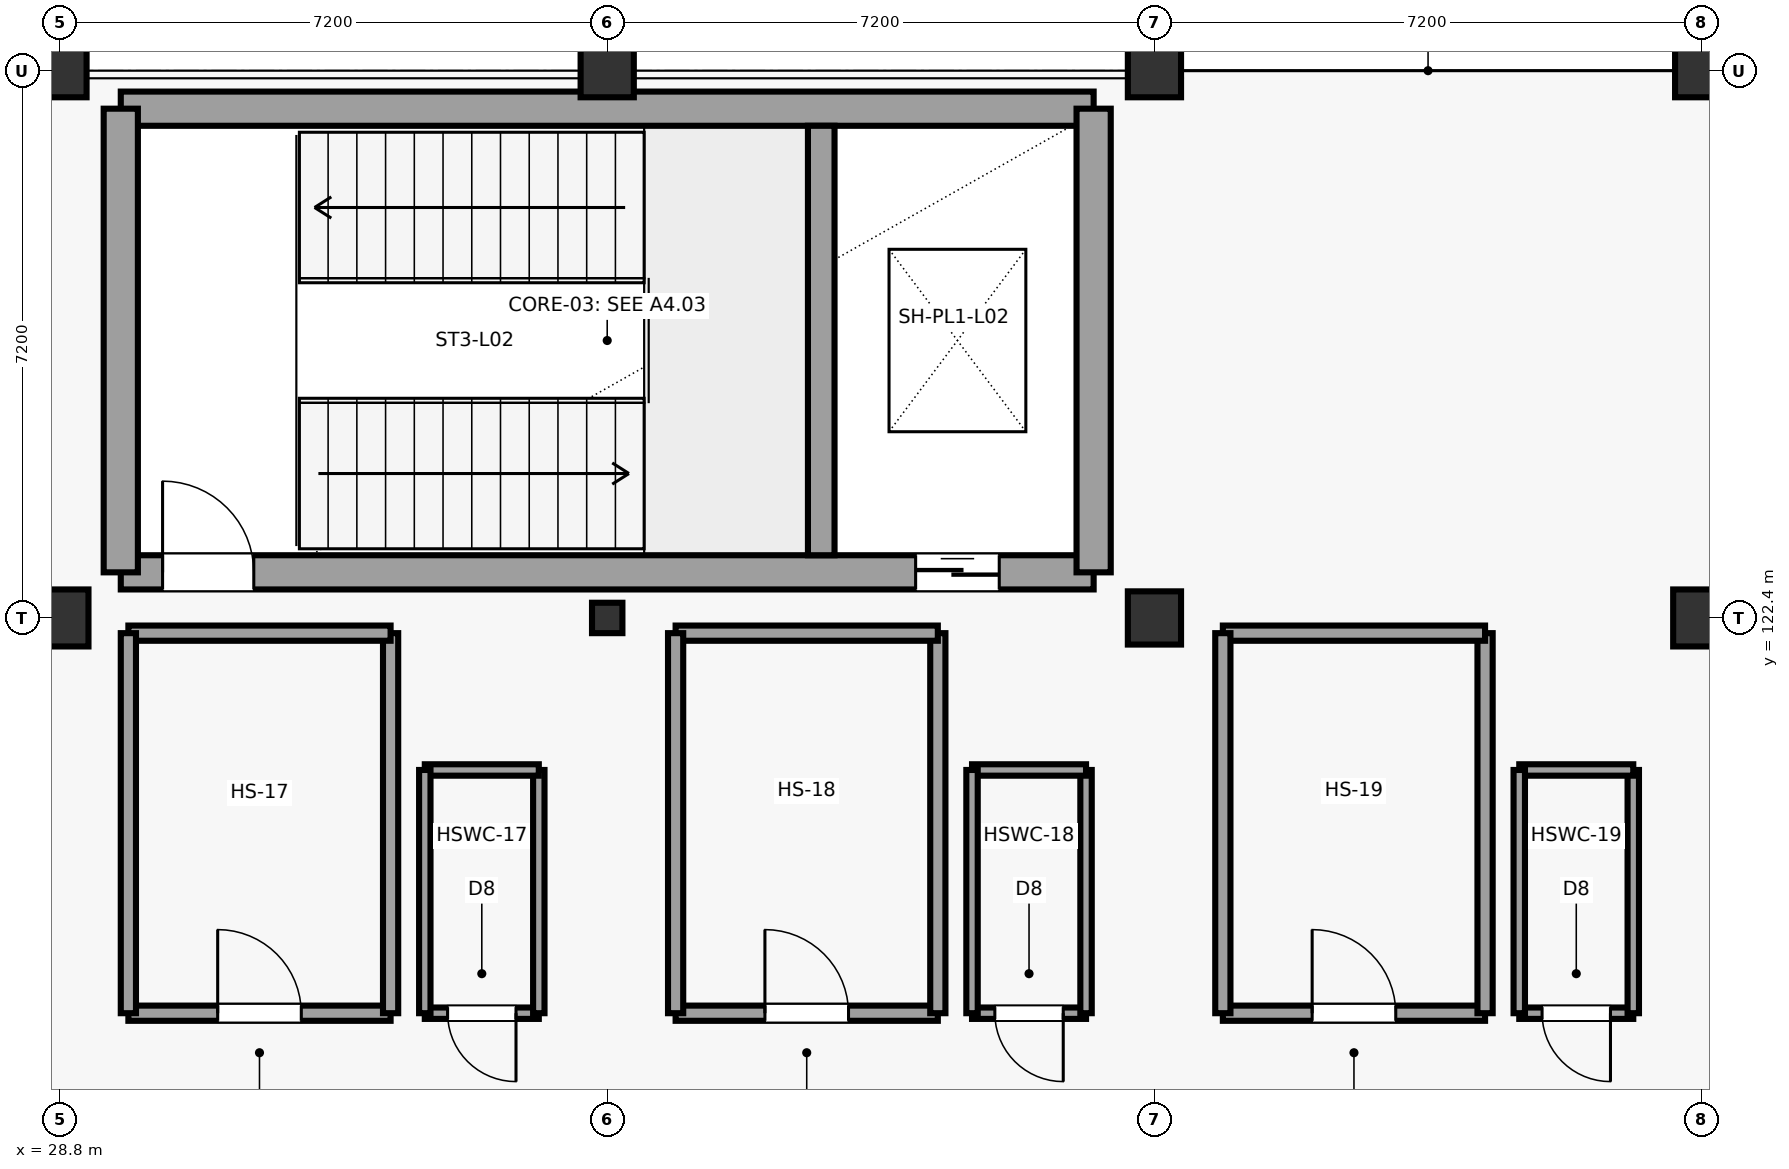
"""IFC4 building model, lengths in metres.
Left out: names, types, materials, properties, quantities, classifications, styles, units other than length and angle.
Written with IfcOpenShell. Run it as: python <this file> out.ifc"""

import sys

from ifc_helpers import new_model, si_unit, direction, frame, frame_2d, origin, origin_2d, place, context, subcontext, project, spatial, rectangle, hollow_rectangle, extrude, element, fill, save


model = new_model("IFC4")
c1 = context("Model", 3, precision=1e-05, world=origin(), true_north=direction((0.0, 1.0)))
c2 = subcontext(c1, "Body", "Model", "MODEL_VIEW")
j1 = project(units=[si_unit("LENGTHUNIT", "METRE"), si_unit("PLANEANGLEUNIT", "RADIAN")], contexts=[c1])
p1 = place(None, origin())
s1 = spatial("IfcSite", under=j1, at=p1, CompositionType="ELEMENT")
p2 = place(p1, origin())
s2 = spatial("IfcBuilding", under=s1, at=p2, CompositionType="ELEMENT")
p3 = place(p2, frame((0.0, 0.0, 9.6)))
s3 = spatial("IfcBuildingStorey", under=s2, at=p3, CompositionType="ELEMENT", Elevation=9.6)
p4 = place(p3, frame((28.8, 122.4, 0.0), z_axis=(0.0, 0.0, 1.0), x_axis=(1.0, 0.0, 0.0)))
e1 = element("IfcColumn", 1, at=p4, inside=s3, PredefinedType="COLUMN", context=c2, shape_type="SweptSolid", body=[
    extrude(rectangle(XDim=0.75, YDim=0.75, at=origin_2d()), origin(), (0.0, 0.0, 1.0), 4.2),
])
p5 = place(p3, frame((28.8, 129.6, 0.0), z_axis=(0.0, 0.0, 1.0), x_axis=(1.0, 0.0, 0.0)))
e2 = element("IfcColumn", 2, at=p5, inside=s3, PredefinedType="COLUMN", context=c2, shape_type="SweptSolid", body=[
    extrude(rectangle(XDim=0.7, YDim=0.7, at=origin_2d()), origin(), (0.0, 0.0, 1.0), 4.2),
])
p6 = place(p3, frame((36.0, 122.4, 0.0), z_axis=(0.0, 0.0, 1.0), x_axis=(1.0, 0.0, 0.0)))
e3 = element("IfcColumn", 3, at=p6, inside=s3, PredefinedType="COLUMN", context=c2, shape_type="SweptSolid", body=[
    extrude(hollow_rectangle(XDim=0.4, YDim=0.4, WallThickness=0.02, at=origin_2d()), origin(), (0.0, 0.0, 1.0), 4.2),
])
for number, where, z_axis, x_axis in (
    (4, (36.0, 129.6, 0.0), (0.0, 0.0, 1.0), (1.0, 0.0, 0.0)),
    (5, (43.2, 122.4, 0.0), (0.0, 0.0, 1.0), (1.0, 0.0, 0.0)),
    (6, (43.2, 129.6, 0.0), (0.0, 0.0, 1.0), (1.0, 0.0, 0.0)),
):
    element("IfcColumn", number, at=place(p3, frame(where, z_axis=z_axis, x_axis=x_axis)), inside=s3, PredefinedType="COLUMN", context=c2, shape_type="SweptSolid", body=[
        extrude(rectangle(XDim=0.7, YDim=0.7, at=origin_2d()), origin(), (0.0, 0.0, 1.0), 4.2),
    ])
p7 = place(p3, frame((50.4, 122.4, 0.0), z_axis=(0.0, 0.0, 1.0), x_axis=(1.0, 0.0, 0.0)))
e7 = element("IfcColumn", 7, at=p7, inside=s3, PredefinedType="COLUMN", context=c2, shape_type="SweptSolid", body=[
    extrude(rectangle(XDim=0.75, YDim=0.75, at=origin_2d()), origin(), (0.0, 0.0, 1.0), 4.2),
])
p8 = place(p3, frame((50.4, 129.6, 0.0), z_axis=(0.0, 0.0, 1.0), x_axis=(1.0, 0.0, 0.0)))
e8 = element("IfcColumn", 8, at=p8, inside=s3, PredefinedType="COLUMN", context=c2, shape_type="SweptSolid", body=[
    extrude(rectangle(XDim=0.7, YDim=0.7, at=origin_2d()), origin(), (0.0, 0.0, 1.0), 4.2),
])
p9 = place(p3, frame((29.6, 123.0, 0.0), z_axis=(0.0, 0.0, 1.0), x_axis=(1.0, 0.0, 0.0)))
e9 = element("IfcWall", 9, at=p9, inside=s3, PredefinedType="SHEAR", context=c2, shape_type="SweptSolid", body=[
    extrude(rectangle(XDim=12.8, YDim=0.45, at=frame_2d((6.4, 0.0))), origin(), (0.0, 0.0, 1.0), 3.88),
])
p10 = place(p9, frame((0.55, 0.0, 0.0)))
e10 = element("IfcOpeningElement", 10, at=p10, cuts=e9, PredefinedType="OPENING", context=c2, shape_type="SweptSolid", body=[
    extrude(rectangle(XDim=1.2, YDim=2.25, at=frame_2d((0.6, 1.125))), frame((0.0, 0.235, 0.0), z_axis=(0.0, -1.0, 0.0), x_axis=(1.0, 0.0, 0.0)), (0.0, 0.0, 1.0), 0.47),
])
p11 = place(p9, frame((10.458, 0.0, 0.0)))
e11 = element("IfcOpeningElement", 11, at=p11, cuts=e9, PredefinedType="OPENING", context=c2, shape_type="SweptSolid", body=[
    extrude(rectangle(XDim=1.1, YDim=2.2, at=frame_2d((0.55, 1.1))), frame((0.0, 0.235, 0.0), z_axis=(0.0, -1.0, 0.0), x_axis=(1.0, 0.0, 0.0)), (0.0, 0.0, 1.0), 0.47),
])
p12 = place(p3, frame((29.6, 129.1, 0.0), z_axis=(0.0, 0.0, 1.0), x_axis=(1.0, 0.0, 0.0)))
e12 = element("IfcWall", 12, at=p12, inside=s3, PredefinedType="SHEAR", context=c2, shape_type="SweptSolid", body=[
    extrude(rectangle(XDim=12.8, YDim=0.45, at=frame_2d((6.4, 0.0))), origin(), (0.0, 0.0, 1.0), 3.88),
])
for number, where, z_axis, x_axis in (
    (13, (29.6, 123.0, 0.0), (0.0, 0.0, 1.0), (0.0, 1.0, 0.0)),
    (14, (42.4, 123.0, 0.0), (0.0, 0.0, 1.0), (0.0, 1.0, 0.0)),
):
    element("IfcWall", number, at=place(p3, frame(where, z_axis=z_axis, x_axis=x_axis)), inside=s3, PredefinedType="SHEAR", context=c2, shape_type="SweptSolid", body=[
        extrude(rectangle(XDim=6.1, YDim=0.45, at=frame_2d((3.05, 0.0))), origin(), (0.0, 0.0, 1.0), 3.88),
    ])
p13 = place(p3, frame((38.816, 123.225, 0.0), z_axis=(0.0, 0.0, 1.0), x_axis=(0.0, 1.0, 0.0)))
e15 = element("IfcWall", 15, at=p13, inside=s3, PredefinedType="SHEAR", context=c2, shape_type="SweptSolid", body=[
    extrude(rectangle(XDim=5.65, YDim=0.35, at=frame_2d((2.825, 0.0))), origin(), (0.0, 0.0, 1.0), 3.88),
])
p14 = place(p3, frame((29.7, 117.2, 0.0), z_axis=(0.0, 0.0, 1.0), x_axis=(1.0, 0.0, 0.0)))
e16 = element("IfcWall", 16, at=p14, inside=s3, PredefinedType="PARTITIONING", context=c2, shape_type="SweptSolid", body=[
    extrude(rectangle(XDim=3.45, YDim=0.2, at=frame_2d((1.725, 0.0))), origin(), (0.0, 0.0, 1.0), 2.94),
])
p15 = place(p14, frame((1.175, 0.0, 0.0)))
e17 = element("IfcOpeningElement", 17, at=p15, cuts=e16, PredefinedType="OPENING", context=c2, shape_type="SweptSolid", body=[
    extrude(rectangle(XDim=1.1, YDim=2.25, at=frame_2d((0.55, 1.125))), frame((0.0, 0.11, 0.0), z_axis=(0.0, -1.0, 0.0), x_axis=(1.0, 0.0, 0.0)), (0.0, 0.0, 1.0), 0.22),
])
p16 = place(p3, frame((33.15, 117.2, 0.0), z_axis=(0.0, 0.0, 1.0), x_axis=(0.0, 1.0, 0.0)))
e18 = element("IfcWall", 18, at=p16, inside=s3, PredefinedType="PARTITIONING", context=c2, shape_type="SweptSolid", body=[
    extrude(rectangle(XDim=5.0, YDim=0.2, at=frame_2d((2.5, 0.0))), origin(), (0.0, 0.0, 1.0), 2.94),
])
p17 = place(p3, frame((33.15, 122.2, 0.0), z_axis=(0.0, 0.0, 1.0), x_axis=(-1.0, 0.0, 0.0)))
e19 = element("IfcWall", 19, at=p17, inside=s3, PredefinedType="PARTITIONING", context=c2, shape_type="SweptSolid", body=[
    extrude(rectangle(XDim=3.45, YDim=0.2, at=frame_2d((1.725, 0.0))), origin(), (0.0, 0.0, 1.0), 2.94),
])
p18 = place(p3, frame((29.7, 122.2, 0.0), z_axis=(0.0, 0.0, 1.0), x_axis=(0.0, -1.0, 0.0)))
e20 = element("IfcWall", 20, at=p18, inside=s3, PredefinedType="PARTITIONING", context=c2, shape_type="SweptSolid", body=[
    extrude(rectangle(XDim=5.0, YDim=0.2, at=frame_2d((2.5, 0.0))), origin(), (0.0, 0.0, 1.0), 2.94),
])
p19 = place(p3, frame((33.6, 117.2, 0.0), z_axis=(0.0, 0.0, 1.0), x_axis=(1.0, 0.0, 0.0)))
e21 = element("IfcWall", 21, at=p19, inside=s3, PredefinedType="PARTITIONING", context=c2, shape_type="SweptSolid", body=[
    extrude(rectangle(XDim=1.5, YDim=0.15, at=frame_2d((0.75, 0.0))), origin(), (0.0, 0.0, 1.0), 2.94),
])
p20 = place(p19, frame((0.3, 0.0, 0.0)))
e22 = element("IfcOpeningElement", 22, at=p20, cuts=e21, PredefinedType="OPENING", context=c2, shape_type="SweptSolid", body=[
    extrude(rectangle(XDim=0.9, YDim=2.15, at=frame_2d((0.45, 1.075))), frame((0.0, 0.085, 0.0), z_axis=(0.0, -1.0, 0.0), x_axis=(1.0, 0.0, 0.0)), (0.0, 0.0, 1.0), 0.17),
])
p21 = place(p3, frame((35.1, 117.2, 0.0), z_axis=(0.0, 0.0, 1.0), x_axis=(0.0, 1.0, 0.0)))
e23 = element("IfcWall", 23, at=p21, inside=s3, PredefinedType="PARTITIONING", context=c2, shape_type="SweptSolid", body=[
    extrude(rectangle(XDim=3.2, YDim=0.15, at=frame_2d((1.6, 0.0))), origin(), (0.0, 0.0, 1.0), 2.94),
])
p22 = place(p3, frame((35.1, 120.4, 0.0), z_axis=(0.0, 0.0, 1.0), x_axis=(-1.0, 0.0, 0.0)))
e24 = element("IfcWall", 24, at=p22, inside=s3, PredefinedType="PARTITIONING", context=c2, shape_type="SweptSolid", body=[
    extrude(rectangle(XDim=1.5, YDim=0.15, at=frame_2d((0.75, 0.0))), origin(), (0.0, 0.0, 1.0), 2.94),
])
p23 = place(p3, frame((33.6, 120.4, 0.0), z_axis=(0.0, 0.0, 1.0), x_axis=(0.0, -1.0, 0.0)))
e25 = element("IfcWall", 25, at=p23, inside=s3, PredefinedType="PARTITIONING", context=c2, shape_type="SweptSolid", body=[
    extrude(rectangle(XDim=3.2, YDim=0.15, at=frame_2d((1.6, 0.0))), origin(), (0.0, 0.0, 1.0), 2.94),
])
p24 = place(p3, frame((36.9, 117.2, 0.0), z_axis=(0.0, 0.0, 1.0), x_axis=(1.0, 0.0, 0.0)))
e26 = element("IfcWall", 26, at=p24, inside=s3, PredefinedType="PARTITIONING", context=c2, shape_type="SweptSolid", body=[
    extrude(rectangle(XDim=3.45, YDim=0.2, at=frame_2d((1.725, 0.0))), origin(), (0.0, 0.0, 1.0), 2.94),
])
p25 = place(p24, frame((1.175, 0.0, 0.0)))
e27 = element("IfcOpeningElement", 27, at=p25, cuts=e26, PredefinedType="OPENING", context=c2, shape_type="SweptSolid", body=[
    extrude(rectangle(XDim=1.1, YDim=2.25, at=frame_2d((0.55, 1.125))), frame((0.0, 0.11, 0.0), z_axis=(0.0, -1.0, 0.0), x_axis=(1.0, 0.0, 0.0)), (0.0, 0.0, 1.0), 0.22),
])
p26 = place(p3, frame((40.35, 117.2, 0.0), z_axis=(0.0, 0.0, 1.0), x_axis=(0.0, 1.0, 0.0)))
e28 = element("IfcWall", 28, at=p26, inside=s3, PredefinedType="PARTITIONING", context=c2, shape_type="SweptSolid", body=[
    extrude(rectangle(XDim=5.0, YDim=0.2, at=frame_2d((2.5, 0.0))), origin(), (0.0, 0.0, 1.0), 2.94),
])
p27 = place(p3, frame((40.35, 122.2, 0.0), z_axis=(0.0, 0.0, 1.0), x_axis=(-1.0, 0.0, 0.0)))
e29 = element("IfcWall", 29, at=p27, inside=s3, PredefinedType="PARTITIONING", context=c2, shape_type="SweptSolid", body=[
    extrude(rectangle(XDim=3.45, YDim=0.2, at=frame_2d((1.725, 0.0))), origin(), (0.0, 0.0, 1.0), 2.94),
])
p28 = place(p3, frame((36.9, 122.2, 0.0), z_axis=(0.0, 0.0, 1.0), x_axis=(0.0, -1.0, 0.0)))
e30 = element("IfcWall", 30, at=p28, inside=s3, PredefinedType="PARTITIONING", context=c2, shape_type="SweptSolid", body=[
    extrude(rectangle(XDim=5.0, YDim=0.2, at=frame_2d((2.5, 0.0))), origin(), (0.0, 0.0, 1.0), 2.94),
])
p29 = place(p3, frame((40.8, 117.2, 0.0), z_axis=(0.0, 0.0, 1.0), x_axis=(1.0, 0.0, 0.0)))
e31 = element("IfcWall", 31, at=p29, inside=s3, PredefinedType="PARTITIONING", context=c2, shape_type="SweptSolid", body=[
    extrude(rectangle(XDim=1.5, YDim=0.15, at=frame_2d((0.75, 0.0))), origin(), (0.0, 0.0, 1.0), 2.94),
])
p30 = place(p29, frame((0.3, 0.0, 0.0)))
e32 = element("IfcOpeningElement", 32, at=p30, cuts=e31, PredefinedType="OPENING", context=c2, shape_type="SweptSolid", body=[
    extrude(rectangle(XDim=0.9, YDim=2.15, at=frame_2d((0.45, 1.075))), frame((0.0, 0.085, 0.0), z_axis=(0.0, -1.0, 0.0), x_axis=(1.0, 0.0, 0.0)), (0.0, 0.0, 1.0), 0.17),
])
p31 = place(p3, frame((42.3, 117.2, 0.0), z_axis=(0.0, 0.0, 1.0), x_axis=(0.0, 1.0, 0.0)))
e33 = element("IfcWall", 33, at=p31, inside=s3, PredefinedType="PARTITIONING", context=c2, shape_type="SweptSolid", body=[
    extrude(rectangle(XDim=3.2, YDim=0.15, at=frame_2d((1.6, 0.0))), origin(), (0.0, 0.0, 1.0), 2.94),
])
p32 = place(p3, frame((42.3, 120.4, 0.0), z_axis=(0.0, 0.0, 1.0), x_axis=(-1.0, 0.0, 0.0)))
e34 = element("IfcWall", 34, at=p32, inside=s3, PredefinedType="PARTITIONING", context=c2, shape_type="SweptSolid", body=[
    extrude(rectangle(XDim=1.5, YDim=0.15, at=frame_2d((0.75, 0.0))), origin(), (0.0, 0.0, 1.0), 2.94),
])
p33 = place(p3, frame((40.8, 120.4, 0.0), z_axis=(0.0, 0.0, 1.0), x_axis=(0.0, -1.0, 0.0)))
e35 = element("IfcWall", 35, at=p33, inside=s3, PredefinedType="PARTITIONING", context=c2, shape_type="SweptSolid", body=[
    extrude(rectangle(XDim=3.2, YDim=0.15, at=frame_2d((1.6, 0.0))), origin(), (0.0, 0.0, 1.0), 2.94),
])
p34 = place(p3, frame((44.1, 117.2, 0.0), z_axis=(0.0, 0.0, 1.0), x_axis=(1.0, 0.0, 0.0)))
e36 = element("IfcWall", 36, at=p34, inside=s3, PredefinedType="PARTITIONING", context=c2, shape_type="SweptSolid", body=[
    extrude(rectangle(XDim=3.45, YDim=0.2, at=frame_2d((1.725, 0.0))), origin(), (0.0, 0.0, 1.0), 2.94),
])
p35 = place(p34, frame((1.175, 0.0, 0.0)))
e37 = element("IfcOpeningElement", 37, at=p35, cuts=e36, PredefinedType="OPENING", context=c2, shape_type="SweptSolid", body=[
    extrude(rectangle(XDim=1.1, YDim=2.25, at=frame_2d((0.55, 1.125))), frame((0.0, 0.11, 0.0), z_axis=(0.0, -1.0, 0.0), x_axis=(1.0, 0.0, 0.0)), (0.0, 0.0, 1.0), 0.22),
])
p36 = place(p3, frame((47.55, 117.2, 0.0), z_axis=(0.0, 0.0, 1.0), x_axis=(0.0, 1.0, 0.0)))
e38 = element("IfcWall", 38, at=p36, inside=s3, PredefinedType="PARTITIONING", context=c2, shape_type="SweptSolid", body=[
    extrude(rectangle(XDim=5.0, YDim=0.2, at=frame_2d((2.5, 0.0))), origin(), (0.0, 0.0, 1.0), 2.94),
])
p37 = place(p3, frame((47.55, 122.2, 0.0), z_axis=(0.0, 0.0, 1.0), x_axis=(-1.0, 0.0, 0.0)))
e39 = element("IfcWall", 39, at=p37, inside=s3, PredefinedType="PARTITIONING", context=c2, shape_type="SweptSolid", body=[
    extrude(rectangle(XDim=3.45, YDim=0.2, at=frame_2d((1.725, 0.0))), origin(), (0.0, 0.0, 1.0), 2.94),
])
p38 = place(p3, frame((44.1, 122.2, 0.0), z_axis=(0.0, 0.0, 1.0), x_axis=(0.0, -1.0, 0.0)))
e40 = element("IfcWall", 40, at=p38, inside=s3, PredefinedType="PARTITIONING", context=c2, shape_type="SweptSolid", body=[
    extrude(rectangle(XDim=5.0, YDim=0.2, at=frame_2d((2.5, 0.0))), origin(), (0.0, 0.0, 1.0), 2.94),
])
p39 = place(p3, frame((48.0, 117.2, 0.0), z_axis=(0.0, 0.0, 1.0), x_axis=(1.0, 0.0, 0.0)))
e41 = element("IfcWall", 41, at=p39, inside=s3, PredefinedType="PARTITIONING", context=c2, shape_type="SweptSolid", body=[
    extrude(rectangle(XDim=1.5, YDim=0.15, at=frame_2d((0.75, 0.0))), origin(), (0.0, 0.0, 1.0), 2.94),
])
p40 = place(p39, frame((0.3, 0.0, 0.0)))
e42 = element("IfcOpeningElement", 42, at=p40, cuts=e41, PredefinedType="OPENING", context=c2, shape_type="SweptSolid", body=[
    extrude(rectangle(XDim=0.9, YDim=2.15, at=frame_2d((0.45, 1.075))), frame((0.0, 0.085, 0.0), z_axis=(0.0, -1.0, 0.0), x_axis=(1.0, 0.0, 0.0)), (0.0, 0.0, 1.0), 0.17),
])
p41 = place(p3, frame((49.5, 117.2, 0.0), z_axis=(0.0, 0.0, 1.0), x_axis=(0.0, 1.0, 0.0)))
e43 = element("IfcWall", 43, at=p41, inside=s3, PredefinedType="PARTITIONING", context=c2, shape_type="SweptSolid", body=[
    extrude(rectangle(XDim=3.2, YDim=0.15, at=frame_2d((1.6, 0.0))), origin(), (0.0, 0.0, 1.0), 2.94),
])
p42 = place(p3, frame((49.5, 120.4, 0.0), z_axis=(0.0, 0.0, 1.0), x_axis=(-1.0, 0.0, 0.0)))
e44 = element("IfcWall", 44, at=p42, inside=s3, PredefinedType="PARTITIONING", context=c2, shape_type="SweptSolid", body=[
    extrude(rectangle(XDim=1.5, YDim=0.15, at=frame_2d((0.75, 0.0))), origin(), (0.0, 0.0, 1.0), 2.94),
])
p43 = place(p3, frame((48.0, 120.4, 0.0), z_axis=(0.0, 0.0, 1.0), x_axis=(0.0, -1.0, 0.0)))
e45 = element("IfcWall", 45, at=p43, inside=s3, PredefinedType="PARTITIONING", context=c2, shape_type="SweptSolid", body=[
    extrude(rectangle(XDim=3.2, YDim=0.15, at=frame_2d((1.6, 0.0))), origin(), (0.0, 0.0, 1.0), 2.94),
])
p44 = place(p10, origin())
e46 = element("IfcDoor", 46, at=p44, inside=s3, OperationType="SINGLE_SWING_LEFT", PredefinedType="DOOR", context=c2, shape_type="SweptSolid", body=[
    extrude(rectangle(XDim=1.2, YDim=2.25, at=frame_2d((0.6, 1.125))), frame((0.0, 0.025, 0.0), z_axis=(0.0, -1.0, 0.0), x_axis=(1.0, 0.0, 0.0)), (0.0, 0.0, 1.0), 0.05),
])
fill(e10, e46)
p45 = place(p11, origin())
e47 = element("IfcDoor", 47, at=p45, inside=s3, OperationType="SLIDING_TO_RIGHT", PredefinedType="DOOR", context=c2, shape_type="SweptSolid", body=[
    extrude(rectangle(XDim=1.1, YDim=2.2, at=frame_2d((0.55, 1.1))), frame((0.0, 0.025, 0.0), z_axis=(0.0, -1.0, 0.0), x_axis=(1.0, 0.0, 0.0)), (0.0, 0.0, 1.0), 0.05),
])
fill(e11, e47)
p46 = place(p15, origin())
e48 = element("IfcDoor", 48, at=p46, inside=s3, OperationType="SINGLE_SWING_LEFT", PredefinedType="DOOR", context=c2, shape_type="SweptSolid", body=[
    extrude(rectangle(XDim=1.1, YDim=2.25, at=frame_2d((0.55, 1.125))), frame((0.0, 0.025, 0.0), z_axis=(0.0, -1.0, 0.0), x_axis=(1.0, 0.0, 0.0)), (0.0, 0.0, 1.0), 0.05),
])
fill(e17, e48)
p47 = place(p20, frame((0.9, 0.0, 0.0), z_axis=(0.0, 0.0, 1.0), x_axis=(-1.0, 0.0, 0.0)))
e49 = element("IfcDoor", 49, at=p47, inside=s3, OperationType="SINGLE_SWING_RIGHT", PredefinedType="DOOR", context=c2, shape_type="SweptSolid", body=[
    extrude(rectangle(XDim=0.9, YDim=2.15, at=frame_2d((0.45, 1.075))), frame((0.0, 0.025, 0.0), z_axis=(0.0, -1.0, 0.0), x_axis=(1.0, 0.0, 0.0)), (0.0, 0.0, 1.0), 0.05),
])
fill(e22, e49)
p48 = place(p25, origin())
e50 = element("IfcDoor", 50, at=p48, inside=s3, OperationType="SINGLE_SWING_LEFT", PredefinedType="DOOR", context=c2, shape_type="SweptSolid", body=[
    extrude(rectangle(XDim=1.1, YDim=2.25, at=frame_2d((0.55, 1.125))), frame((0.0, 0.025, 0.0), z_axis=(0.0, -1.0, 0.0), x_axis=(1.0, 0.0, 0.0)), (0.0, 0.0, 1.0), 0.05),
])
fill(e27, e50)
p49 = place(p30, frame((0.9, 0.0, 0.0), z_axis=(0.0, 0.0, 1.0), x_axis=(-1.0, 0.0, 0.0)))
e51 = element("IfcDoor", 51, at=p49, inside=s3, OperationType="SINGLE_SWING_RIGHT", PredefinedType="DOOR", context=c2, shape_type="SweptSolid", body=[
    extrude(rectangle(XDim=0.9, YDim=2.15, at=frame_2d((0.45, 1.075))), frame((0.0, 0.025, 0.0), z_axis=(0.0, -1.0, 0.0), x_axis=(1.0, 0.0, 0.0)), (0.0, 0.0, 1.0), 0.05),
])
fill(e32, e51)
p50 = place(p35, origin())
e52 = element("IfcDoor", 52, at=p50, inside=s3, OperationType="SINGLE_SWING_LEFT", PredefinedType="DOOR", context=c2, shape_type="SweptSolid", body=[
    extrude(rectangle(XDim=1.1, YDim=2.25, at=frame_2d((0.55, 1.125))), frame((0.0, 0.025, 0.0), z_axis=(0.0, -1.0, 0.0), x_axis=(1.0, 0.0, 0.0)), (0.0, 0.0, 1.0), 0.05),
])
fill(e37, e52)
p51 = place(p40, frame((0.9, 0.0, 0.0), z_axis=(0.0, 0.0, 1.0), x_axis=(-1.0, 0.0, 0.0)))
e53 = element("IfcDoor", 53, at=p51, inside=s3, OperationType="SINGLE_SWING_RIGHT", PredefinedType="DOOR", context=c2, shape_type="SweptSolid", body=[
    extrude(rectangle(XDim=0.9, YDim=2.15, at=frame_2d((0.45, 1.075))), frame((0.0, 0.025, 0.0), z_axis=(0.0, -1.0, 0.0), x_axis=(1.0, 0.0, 0.0)), (0.0, 0.0, 1.0), 0.05),
])
fill(e42, e53)
save(model, sys.argv[1])
